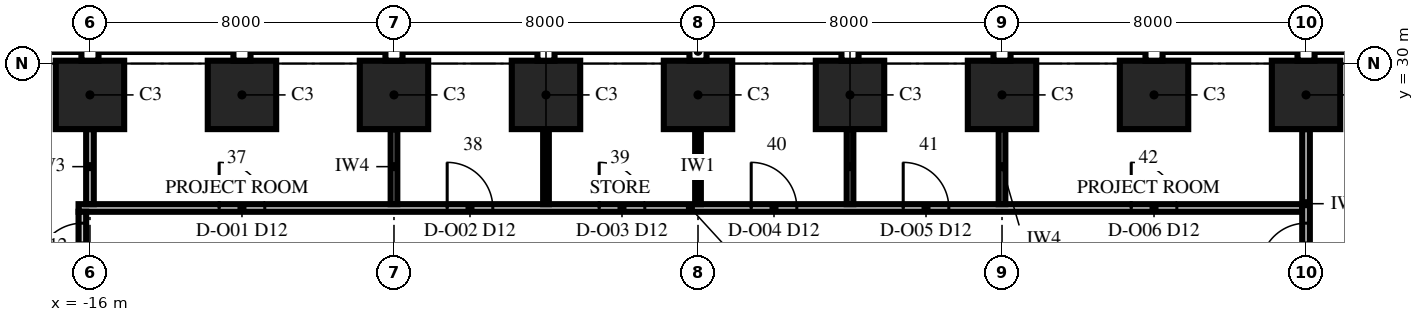
"""IFC4 building model, lengths in metres.
Left out: names, types, materials, properties, quantities, classifications, styles, units other than length and angle.
Written with IfcOpenShell. Run it as: python <this file> out.ifc"""

import sys

from ifc_helpers import new_model, si_unit, direction, frame, frame_2d, origin, origin_2d, place, context, subcontext, project, spatial, rectangle, extrude, element, fill, save


model = new_model("IFC4")
c1 = context("Model", 3, precision=1e-05, world=origin(), true_north=direction((0.0, 1.0)))
c2 = subcontext(c1, "Body", "Model", "MODEL_VIEW")
j1 = project(units=[si_unit("LENGTHUNIT", "METRE"), si_unit("PLANEANGLEUNIT", "RADIAN")], contexts=[c1])
p1 = place(None, origin())
s1 = spatial("IfcSite", under=j1, at=p1, CompositionType="ELEMENT")
p2 = place(p1, origin())
s2 = spatial("IfcBuilding", under=s1, at=p2, CompositionType="ELEMENT")
p3 = place(p2, frame((0.0, 0.0, 139.0)))
s3 = spatial("IfcBuildingStorey", under=s2, at=p3, CompositionType="ELEMENT", Elevation=139.0)
for number, where, z_axis, x_axis in (
    (1, (16.0, 29.175, 0.0), (0.0, 0.0, 1.0), (-1.0, 0.0, 0.0)),
    (2, (12.0, 29.175, 0.0), (0.0, 0.0, 1.0), (-1.0, 0.0, 0.0)),
    (3, (8.0, 29.175, 0.0), (0.0, 0.0, 1.0), (-1.0, 0.0, 0.0)),
    (4, (4.0, 29.175, 0.0), (0.0, 0.0, 1.0), (-1.0, 0.0, 0.0)),
    (5, (0.0, 29.175, 0.0), (0.0, 0.0, 1.0), (-1.0, 0.0, 0.0)),
    (6, (-4.0, 29.175, 0.0), (0.0, 0.0, 1.0), (-1.0, 0.0, 0.0)),
    (7, (-8.0, 29.175, 0.0), (0.0, 0.0, 1.0), (-1.0, 0.0, 0.0)),
    (8, (-12.0, 29.175, 0.0), (0.0, 0.0, 1.0), (-1.0, 0.0, 0.0)),
    (9, (-16.0, 29.175, 0.0), (0.0, 0.0, 1.0), (-1.0, 0.0, 0.0)),
):
    element("IfcColumn", number, at=place(p3, frame(where, z_axis=z_axis, x_axis=x_axis)), inside=s3, PredefinedType="COLUMN", context=c2, shape_type="SweptSolid", body=[
        extrude(rectangle(XDim=1.8, YDim=1.8, at=origin_2d()), origin(), (0.0, 0.0, 1.0), 4.0),
    ])
p4 = place(p3, frame((-16.3, 26.2, 0.0), z_axis=(0.0, 0.0, 1.0), x_axis=(1.0, 0.0, 0.0)))
e10 = element("IfcWall", 10, at=p4, inside=s3, PredefinedType="PARTITIONING", context=c2, shape_type="SweptSolid", body=[
    extrude(rectangle(XDim=32.2, YDim=0.2, at=frame_2d((16.1, 0.0))), origin(), (0.0, 0.0, 1.0), 3.4),
])
p5 = place(p4, frame((3.7, 0.0, 0.0)))
e11 = element("IfcOpeningElement", 11, at=p5, cuts=e10, PredefinedType="OPENING", context=c2, shape_type="SweptSolid", body=[
    extrude(rectangle(XDim=1.2, YDim=2.4, at=frame_2d((0.6, 1.2))), frame((0.0, 0.115, 0.0), z_axis=(0.0, -1.0, 0.0), x_axis=(1.0, 0.0, 0.0)), (0.0, 0.0, 1.0), 0.23),
])
p6 = place(p4, frame((9.7, 0.0, 0.0)))
e12 = element("IfcOpeningElement", 12, at=p6, cuts=e10, PredefinedType="OPENING", context=c2, shape_type="SweptSolid", body=[
    extrude(rectangle(XDim=1.2, YDim=2.4, at=frame_2d((0.6, 1.2))), frame((0.0, 0.115, 0.0), z_axis=(0.0, -1.0, 0.0), x_axis=(1.0, 0.0, 0.0)), (0.0, 0.0, 1.0), 0.23),
])
p7 = place(p4, frame((13.7, 0.0, 0.0)))
e13 = element("IfcOpeningElement", 13, at=p7, cuts=e10, PredefinedType="OPENING", context=c2, shape_type="SweptSolid", body=[
    extrude(rectangle(XDim=1.2, YDim=2.4, at=frame_2d((0.6, 1.2))), frame((0.0, 0.115, 0.0), z_axis=(0.0, -1.0, 0.0), x_axis=(1.0, 0.0, 0.0)), (0.0, 0.0, 1.0), 0.23),
])
p8 = place(p4, frame((17.7, 0.0, 0.0)))
e14 = element("IfcOpeningElement", 14, at=p8, cuts=e10, PredefinedType="OPENING", context=c2, shape_type="SweptSolid", body=[
    extrude(rectangle(XDim=1.2, YDim=2.4, at=frame_2d((0.6, 1.2))), frame((0.0, 0.115, 0.0), z_axis=(0.0, -1.0, 0.0), x_axis=(1.0, 0.0, 0.0)), (0.0, 0.0, 1.0), 0.23),
])
p9 = place(p4, frame((21.7, 0.0, 0.0)))
e15 = element("IfcOpeningElement", 15, at=p9, cuts=e10, PredefinedType="OPENING", context=c2, shape_type="SweptSolid", body=[
    extrude(rectangle(XDim=1.2, YDim=2.4, at=frame_2d((0.6, 1.2))), frame((0.0, 0.115, 0.0), z_axis=(0.0, -1.0, 0.0), x_axis=(1.0, 0.0, 0.0)), (0.0, 0.0, 1.0), 0.23),
])
p10 = place(p4, frame((27.7, 0.0, 0.0)))
e16 = element("IfcOpeningElement", 16, at=p10, cuts=e10, PredefinedType="OPENING", context=c2, shape_type="SweptSolid", body=[
    extrude(rectangle(XDim=1.2, YDim=2.4, at=frame_2d((0.6, 1.2))), frame((0.0, 0.115, 0.0), z_axis=(0.0, -1.0, 0.0), x_axis=(1.0, 0.0, 0.0)), (0.0, 0.0, 1.0), 0.23),
])
p11 = place(p3, frame((-16.2, 5.85, 0.0), z_axis=(0.0, 0.0, 1.0), x_axis=(0.0, 1.0, 0.0)))
e17 = element("IfcWall", 17, at=p11, inside=s3, PredefinedType="PARTITIONING", context=c2, shape_type="SweptSolid", body=[
    extrude(rectangle(XDim=20.25, YDim=0.2, at=frame_2d((10.125, 0.0))), origin(), (0.0, 0.0, 1.0), 2.842),
])
p12 = place(p11, frame((18.75, 0.0, 0.0)))
e18 = element("IfcOpeningElement", 18, at=p12, cuts=e17, PredefinedType="OPENING", context=c2, shape_type="SweptSolid", body=[
    extrude(rectangle(XDim=1.2, YDim=2.4, at=frame_2d((0.6, 1.2))), frame((0.0, 0.115, 0.0), z_axis=(0.0, -1.0, 0.0), x_axis=(1.0, 0.0, 0.0)), (0.0, 0.0, 1.0), 0.23),
])
p13 = place(p3, frame((-16.0, 26.3, 0.0), z_axis=(0.0, 0.0, 1.0), x_axis=(0.0, 1.0, 0.0)))
e19 = element("IfcWall", 19, at=p13, inside=s3, PredefinedType="PARTITIONING", context=c2, shape_type="SweptSolid", body=[
    extrude(rectangle(XDim=1.975, YDim=0.2, at=frame_2d((0.987, 0.0))), origin(), (0.0, 0.0, 1.0), 3.4),
])
p14 = place(p3, frame((-8.0, 26.3, 0.0), z_axis=(0.0, 0.0, 1.0), x_axis=(0.0, 1.0, 0.0)))
e20 = element("IfcWall", 20, at=p14, inside=s3, PredefinedType="PARTITIONING", context=c2, shape_type="SweptSolid", body=[
    extrude(rectangle(XDim=1.975, YDim=0.175, at=frame_2d((0.987, 0.0))), origin(), (0.0, 0.0, 1.0), 3.4),
])
p15 = place(p3, frame((-4.0, 26.3, 0.0), z_axis=(0.0, 0.0, 1.0), x_axis=(0.0, 1.0, 0.0)))
e21 = element("IfcWall", 21, at=p15, inside=s3, PredefinedType="PARTITIONING", context=c2, shape_type="SweptSolid", body=[
    extrude(rectangle(XDim=1.975, YDim=0.15, at=frame_2d((0.987, 0.0))), origin(), (0.0, 0.0, 1.0), 3.85),
])
p16 = place(p3, frame((0.0, 26.3, 0.0), z_axis=(0.0, 0.0, 1.0), x_axis=(0.0, 1.0, 0.0)))
e22 = element("IfcWall", 22, at=p16, inside=s3, PredefinedType="PARTITIONING", context=c2, shape_type="SweptSolid", body=[
    extrude(rectangle(XDim=1.975, YDim=0.15, at=frame_2d((0.987, 0.0))), origin(), (0.0, 0.0, 1.0), 3.4),
])
p17 = place(p3, frame((4.0, 26.3, 0.0), z_axis=(0.0, 0.0, 1.0), x_axis=(0.0, 1.0, 0.0)))
e23 = element("IfcWall", 23, at=p17, inside=s3, PredefinedType="PARTITIONING", context=c2, shape_type="SweptSolid", body=[
    extrude(rectangle(XDim=1.975, YDim=0.175, at=frame_2d((0.987, 0.0))), origin(), (0.0, 0.0, 1.0), 3.85),
])
p18 = place(p3, frame((8.0, 26.3, 0.0), z_axis=(0.0, 0.0, 1.0), x_axis=(0.0, 1.0, 0.0)))
e24 = element("IfcWall", 24, at=p18, inside=s3, PredefinedType="PARTITIONING", context=c2, shape_type="SweptSolid", body=[
    extrude(rectangle(XDim=1.975, YDim=0.175, at=frame_2d((0.987, 0.0))), origin(), (0.0, 0.0, 1.0), 3.4),
])
p19 = place(p3, frame((16.0, 24.35, 0.0), z_axis=(0.0, 0.0, 1.0), x_axis=(0.0, 1.0, 0.0)))
e25 = element("IfcWall", 25, at=p19, inside=s3, PredefinedType="PARTITIONING", context=c2, shape_type="SweptSolid", body=[
    extrude(rectangle(XDim=3.925, YDim=0.2, at=frame_2d((1.962, 0.0))), origin(), (0.0, 0.0, 1.0), 3.4),
])
p20 = place(p19, frame((0.25, 0.0, 0.0)))
e26 = element("IfcOpeningElement", 26, at=p20, cuts=e25, PredefinedType="OPENING", context=c2, shape_type="SweptSolid", body=[
    extrude(rectangle(XDim=1.2, YDim=2.4, at=frame_2d((0.6, 1.2))), frame((0.0, 0.115, 0.0), z_axis=(0.0, -1.0, 0.0), x_axis=(1.0, 0.0, 0.0)), (0.0, 0.0, 1.0), 0.23),
])
p21 = place(p5, origin())
e27 = element("IfcDoor", 27, at=p21, inside=s3, OperationType="SINGLE_SWING_LEFT", PredefinedType="DOOR", context=c2, shape_type="SweptSolid", body=[
    extrude(rectangle(XDim=1.2, YDim=2.4, at=frame_2d((0.6, 1.2))), frame((0.0, 0.1, 0.0), z_axis=(0.0, -1.0, 0.0), x_axis=(1.0, 0.0, 0.0)), (0.0, 0.0, 1.0), 0.199),
])
fill(e11, e27)
p22 = place(p6, origin())
e28 = element("IfcDoor", 28, at=p22, inside=s3, OperationType="SINGLE_SWING_LEFT", PredefinedType="DOOR", context=c2, shape_type="SweptSolid", body=[
    extrude(rectangle(XDim=1.2, YDim=2.4, at=frame_2d((0.6, 1.2))), frame((0.0, 0.1, 0.0), z_axis=(0.0, -1.0, 0.0), x_axis=(1.0, 0.0, 0.0)), (0.0, 0.0, 1.0), 0.199),
])
fill(e12, e28)
p23 = place(p7, origin())
e29 = element("IfcDoor", 29, at=p23, inside=s3, OperationType="SINGLE_SWING_LEFT", PredefinedType="DOOR", context=c2, shape_type="SweptSolid", body=[
    extrude(rectangle(XDim=1.2, YDim=2.4, at=frame_2d((0.6, 1.2))), frame((0.0, 0.1, 0.0), z_axis=(0.0, -1.0, 0.0), x_axis=(1.0, 0.0, 0.0)), (0.0, 0.0, 1.0), 0.199),
])
fill(e13, e29)
p24 = place(p8, origin())
e30 = element("IfcDoor", 30, at=p24, inside=s3, OperationType="SINGLE_SWING_LEFT", PredefinedType="DOOR", context=c2, shape_type="SweptSolid", body=[
    extrude(rectangle(XDim=1.2, YDim=2.4, at=frame_2d((0.6, 1.2))), frame((0.0, 0.1, 0.0), z_axis=(0.0, -1.0, 0.0), x_axis=(1.0, 0.0, 0.0)), (0.0, 0.0, 1.0), 0.199),
])
fill(e14, e30)
p25 = place(p9, origin())
e31 = element("IfcDoor", 31, at=p25, inside=s3, OperationType="SINGLE_SWING_LEFT", PredefinedType="DOOR", context=c2, shape_type="SweptSolid", body=[
    extrude(rectangle(XDim=1.2, YDim=2.4, at=frame_2d((0.6, 1.2))), frame((0.0, 0.1, 0.0), z_axis=(0.0, -1.0, 0.0), x_axis=(1.0, 0.0, 0.0)), (0.0, 0.0, 1.0), 0.199),
])
fill(e15, e31)
p26 = place(p10, origin())
e32 = element("IfcDoor", 32, at=p26, inside=s3, OperationType="SINGLE_SWING_LEFT", PredefinedType="DOOR", context=c2, shape_type="SweptSolid", body=[
    extrude(rectangle(XDim=1.2, YDim=2.4, at=frame_2d((0.6, 1.2))), frame((0.0, 0.1, 0.0), z_axis=(0.0, -1.0, 0.0), x_axis=(1.0, 0.0, 0.0)), (0.0, 0.0, 1.0), 0.199),
])
fill(e16, e32)
p27 = place(p12, origin())
e33 = element("IfcDoor", 33, at=p27, inside=s3, OperationType="SINGLE_SWING_LEFT", PredefinedType="DOOR", context=c2, shape_type="SweptSolid", body=[
    extrude(rectangle(XDim=1.2, YDim=2.4, at=frame_2d((0.6, 1.2))), frame((0.0, 0.1, 0.0), z_axis=(0.0, -1.0, 0.0), x_axis=(1.0, 0.0, 0.0)), (0.0, 0.0, 1.0), 0.199),
])
fill(e18, e33)
p28 = place(p20, origin())
e34 = element("IfcDoor", 34, at=p28, inside=s3, OperationType="SINGLE_SWING_LEFT", PredefinedType="DOOR", context=c2, shape_type="SweptSolid", body=[
    extrude(rectangle(XDim=1.2, YDim=2.4, at=frame_2d((0.6, 1.2))), frame((0.0, 0.1, 0.0), z_axis=(0.0, -1.0, 0.0), x_axis=(1.0, 0.0, 0.0)), (0.0, 0.0, 1.0), 0.199),
])
fill(e26, e34)
save(model, sys.argv[1])
